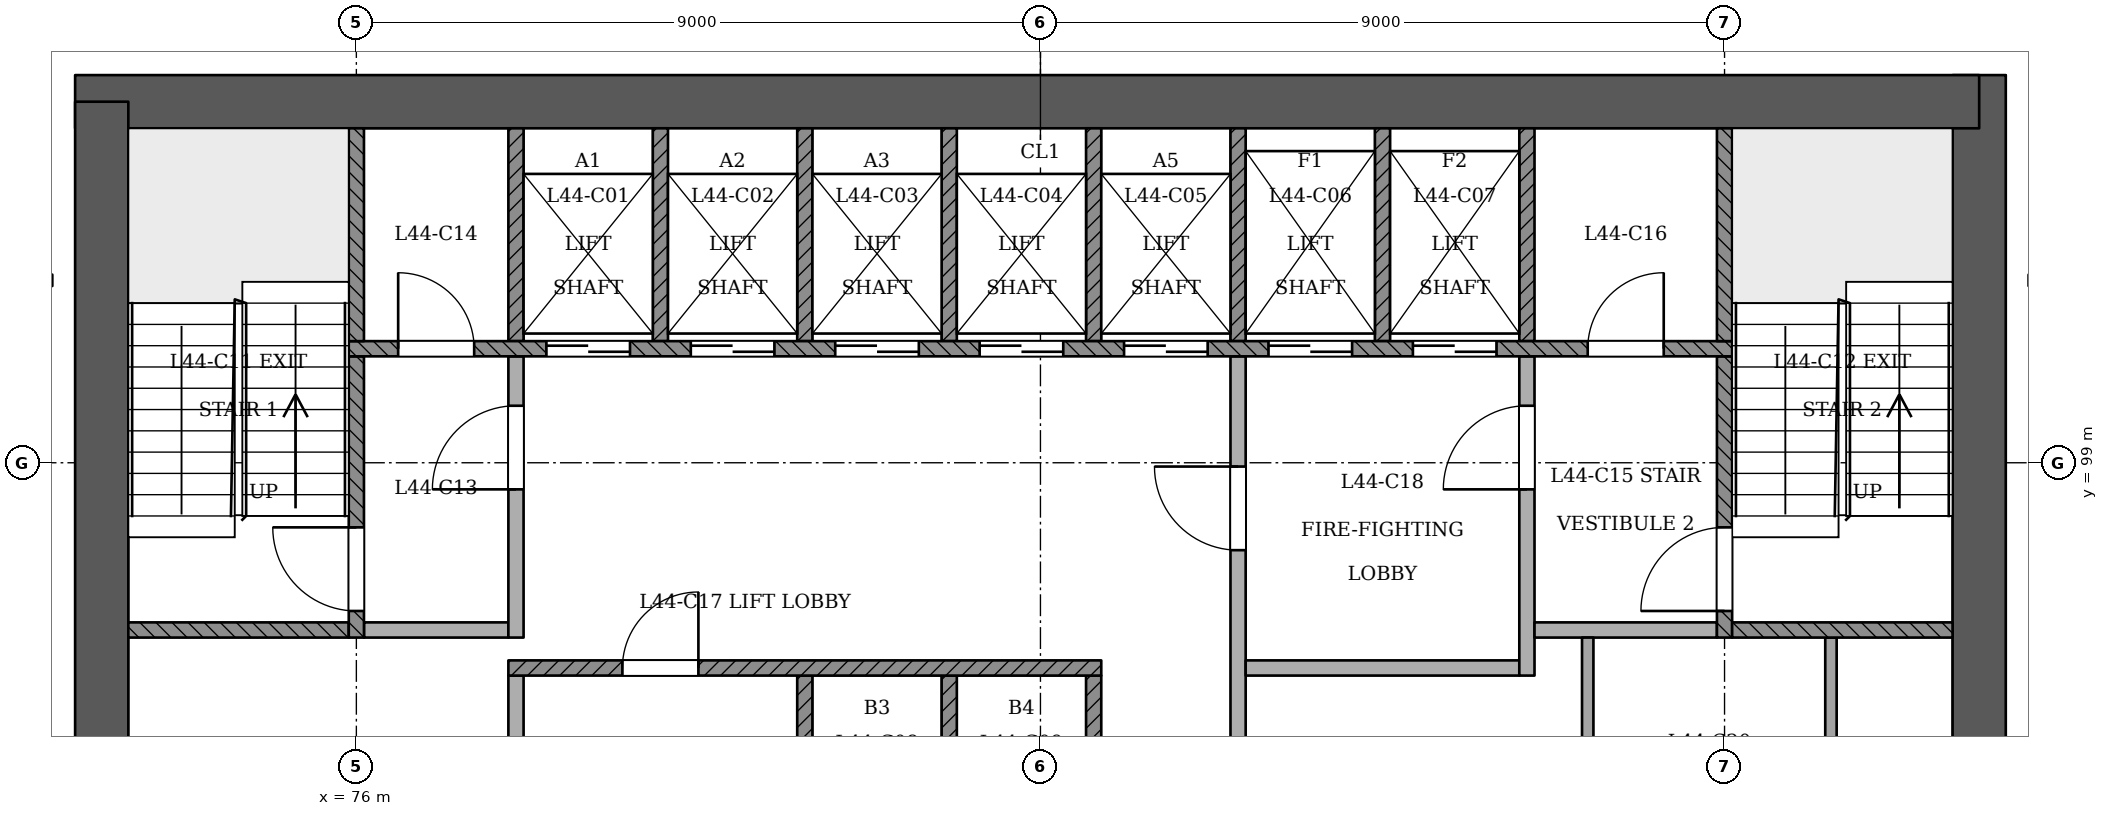
"""IFC4 building model, lengths in metres.
Left out: names, types, materials, properties, quantities, classifications, styles, units other than length and angle.
Written with IfcOpenShell. Run it as: python <this file> out.ifc"""

import sys

from ifc_helpers import new_model, si_unit, direction, frame, frame_2d, origin, place, context, subcontext, project, spatial, rectangle, extrude, element, fill, save


model = new_model("IFC4")
c1 = context("Model", 3, precision=1e-05, world=origin(), true_north=direction((0.0, 1.0)))
c2 = subcontext(c1, "Body", "Model", "MODEL_VIEW")
j1 = project(units=[si_unit("LENGTHUNIT", "METRE"), si_unit("PLANEANGLEUNIT", "RADIAN")], contexts=[c1])
p1 = place(None, origin())
s1 = spatial("IfcSite", under=j1, at=p1, CompositionType="ELEMENT")
p2 = place(p1, origin())
s2 = spatial("IfcBuilding", under=s1, at=p2, CompositionType="ELEMENT")
p3 = place(p2, frame((0.0, 0.0, 171.0)))
s3 = spatial("IfcBuildingStorey", under=s2, at=p3, CompositionType="ELEMENT", Elevation=171.0)
p4 = place(p3, frame((97.35, 93.05, 0.0), z_axis=(0.0, 0.0, 1.0), x_axis=(0.0, 1.0, 0.0)))
e1 = element("IfcWall", 1, at=p4, inside=s3, PredefinedType="SHEAR", context=c2, shape_type="SweptSolid", body=[
    extrude(rectangle(XDim=11.05, YDim=0.7, at=frame_2d((5.525, 0.0))), origin(), (0.0, 0.0, 1.0), 3.6),
])
p5 = place(p3, frame((97.35, 103.75, 0.0), z_axis=(0.0, 0.0, 1.0), x_axis=(-1.0, 0.0, 0.0)))
e2 = element("IfcWall", 2, at=p5, inside=s3, PredefinedType="SHEAR", context=c2, shape_type="SweptSolid", body=[
    extrude(rectangle(XDim=25.05, YDim=0.7, at=frame_2d((12.525, 0.0))), origin(), (0.0, 0.0, 1.0), 3.6),
])
p6 = place(p3, frame((72.65, 103.75, 0.0), z_axis=(0.0, 0.0, 1.0), x_axis=(0.0, -1.0, 0.0)))
e3 = element("IfcWall", 3, at=p6, inside=s3, PredefinedType="SHEAR", context=c2, shape_type="SweptSolid", body=[
    extrude(rectangle(XDim=11.05, YDim=0.7, at=frame_2d((5.525, 0.0))), origin(), (0.0, 0.0, 1.0), 3.6),
])
p7 = place(p3, frame((78.1, 93.4, 0.0), z_axis=(0.0, 0.0, 1.0), x_axis=(0.0, 1.0, 0.0)))
e4 = element("IfcWall", 4, at=p7, inside=s3, PredefinedType="PARTITIONING", context=c2, shape_type="SweptSolid", body=[
    extrude(rectangle(XDim=2.8, YDim=0.2, at=frame_2d((1.4, 0.0))), origin(), (0.0, 0.0, 1.0), 3.15),
])
for number, where, z_axis, x_axis in (
    (5, (81.9, 93.4, 0.0), (0.0, 0.0, 1.0), (0.0, 1.0, 0.0)),
    (6, (83.8, 93.4, 0.0), (0.0, 0.0, 1.0), (0.0, 1.0, 0.0)),
    (7, (85.7, 93.4, 0.0), (0.0, 0.0, 1.0), (0.0, 1.0, 0.0)),
):
    element("IfcWall", number, at=place(p3, frame(where, z_axis=z_axis, x_axis=x_axis)), inside=s3, PredefinedType="SOLIDWALL", context=c2, shape_type="SweptSolid", body=[
        extrude(rectangle(XDim=2.8, YDim=0.2, at=frame_2d((1.4, 0.0))), origin(), (0.0, 0.0, 1.0), 3.15),
    ])
p8 = place(p3, frame((87.6, 93.4, 0.0), z_axis=(0.0, 0.0, 1.0), x_axis=(0.0, 1.0, 0.0)))
e8 = element("IfcWall", 8, at=p8, inside=s3, PredefinedType="PARTITIONING", context=c2, shape_type="SweptSolid", body=[
    extrude(rectangle(XDim=7.0, YDim=0.2, at=frame_2d((3.5, 0.0))), origin(), (0.0, 0.0, 1.0), 3.15),
])
p9 = place(p8, frame((4.45, 0.0, 0.0)))
e9 = element("IfcOpeningElement", 9, at=p9, cuts=e8, PredefinedType="OPENING", context=c2, shape_type="SweptSolid", body=[
    extrude(rectangle(XDim=1.1, YDim=2.1, at=frame_2d((0.55, 1.05))), frame((0.0, 0.11, 0.0), z_axis=(0.0, -1.0, 0.0), x_axis=(1.0, 0.0, 0.0)), (0.0, 0.0, 1.0), 0.221),
])
for number, where, z_axis, x_axis in (
    (10, (92.2, 93.4, 0.0), (0.0, 0.0, 1.0), (0.0, 1.0, 0.0)),
    (11, (95.4, 93.4, 0.0), (0.0, 0.0, 1.0), (0.0, 1.0, 0.0)),
):
    element("IfcWall", number, at=place(p3, frame(where, z_axis=z_axis, x_axis=x_axis)), inside=s3, PredefinedType="PARTITIONING", context=c2, shape_type="SweptSolid", body=[
        extrude(rectangle(XDim=3.3, YDim=0.15, at=frame_2d((1.65, 0.0))), origin(), (0.0, 0.0, 1.0), 3.15),
    ])
p10 = place(p3, frame((78.0, 96.3, 0.0), z_axis=(0.0, 0.0, 1.0), x_axis=(1.0, 0.0, 0.0)))
e12 = element("IfcWall", 12, at=p10, inside=s3, PredefinedType="SOLIDWALL", context=c2, shape_type="SweptSolid", body=[
    extrude(rectangle(XDim=7.8, YDim=0.2, at=frame_2d((3.9, 0.0))), origin(), (0.0, 0.0, 1.0), 3.15),
])
p11 = place(p10, frame((1.5, 0.0, 0.0)))
e13 = element("IfcOpeningElement", 13, at=p11, cuts=e12, PredefinedType="OPENING", context=c2, shape_type="SweptSolid", body=[
    extrude(rectangle(XDim=1.0, YDim=2.1, at=frame_2d((0.5, 1.05))), frame((0.0, 0.11, 0.0), z_axis=(0.0, -1.0, 0.0), x_axis=(1.0, 0.0, 0.0)), (0.0, 0.0, 1.0), 0.221),
])
p12 = place(p3, frame((87.7, 96.3, 0.0), z_axis=(0.0, 0.0, 1.0), x_axis=(1.0, 0.0, 0.0)))
e14 = element("IfcWall", 14, at=p12, inside=s3, PredefinedType="PARTITIONING", context=c2, shape_type="SweptSolid", body=[
    extrude(rectangle(XDim=3.6, YDim=0.2, at=frame_2d((1.8, 0.0))), origin(), (0.0, 0.0, 1.0), 3.15),
])
p13 = place(p3, frame((91.4, 96.2, 0.0), z_axis=(0.0, 0.0, 1.0), x_axis=(0.0, 1.0, 0.0)))
e15 = element("IfcWall", 15, at=p13, inside=s3, PredefinedType="PARTITIONING", context=c2, shape_type="SweptSolid", body=[
    extrude(rectangle(XDim=4.2, YDim=0.2, at=frame_2d((2.1, 0.0))), origin(), (0.0, 0.0, 1.0), 3.15),
])
p14 = place(p13, frame((2.45, 0.0, 0.0)))
e16 = element("IfcOpeningElement", 16, at=p14, cuts=e15, PredefinedType="OPENING", context=c2, shape_type="SweptSolid", body=[
    extrude(rectangle(XDim=1.1, YDim=2.1, at=frame_2d((0.55, 1.05))), frame((0.0, 0.11, 0.0), z_axis=(0.0, -1.0, 0.0), x_axis=(1.0, 0.0, 0.0)), (0.0, 0.0, 1.0), 0.221),
])
p15 = place(p3, frame((73.0, 96.8, 0.0), z_axis=(0.0, 0.0, 1.0), x_axis=(1.0, 0.0, 0.0)))
e17 = element("IfcWall", 17, at=p15, inside=s3, PredefinedType="SOLIDWALL", context=c2, shape_type="SweptSolid", body=[
    extrude(rectangle(XDim=2.9, YDim=0.2, at=frame_2d((1.45, 0.0))), origin(), (0.0, 0.0, 1.0), 3.15),
])
p16 = place(p3, frame((76.0, 96.7, 0.0), z_axis=(0.0, 0.0, 1.0), x_axis=(0.0, 1.0, 0.0)))
e18 = element("IfcWall", 18, at=p16, inside=s3, PredefinedType="SOLIDWALL", context=c2, shape_type="SweptSolid", body=[
    extrude(rectangle(XDim=3.7, YDim=0.2, at=frame_2d((1.85, 0.0))), origin(), (0.0, 0.0, 1.0), 3.15),
])
p17 = place(p16, frame((0.35, 0.0, 0.0)))
e19 = element("IfcOpeningElement", 19, at=p17, cuts=e18, PredefinedType="OPENING", context=c2, shape_type="SweptSolid", body=[
    extrude(rectangle(XDim=1.1, YDim=2.1, at=frame_2d((0.55, 1.05))), frame((0.0, 0.11, 0.0), z_axis=(0.0, -1.0, 0.0), x_axis=(1.0, 0.0, 0.0)), (0.0, 0.0, 1.0), 0.221),
])
p18 = place(p3, frame((76.1, 96.8, 0.0), z_axis=(0.0, 0.0, 1.0), x_axis=(1.0, 0.0, 0.0)))
e20 = element("IfcWall", 20, at=p18, inside=s3, PredefinedType="PARTITIONING", context=c2, shape_type="SweptSolid", body=[
    extrude(rectangle(XDim=1.9, YDim=0.2, at=frame_2d((0.95, 0.0))), origin(), (0.0, 0.0, 1.0), 3.15),
])
p19 = place(p3, frame((78.1, 96.7, 0.0), z_axis=(0.0, 0.0, 1.0), x_axis=(0.0, 1.0, 0.0)))
e21 = element("IfcWall", 21, at=p19, inside=s3, PredefinedType="PARTITIONING", context=c2, shape_type="SweptSolid", body=[
    extrude(rectangle(XDim=3.7, YDim=0.2, at=frame_2d((1.85, 0.0))), origin(), (0.0, 0.0, 1.0), 3.15),
])
p20 = place(p19, frame((1.95, 0.0, 0.0)))
e22 = element("IfcOpeningElement", 22, at=p20, cuts=e21, PredefinedType="OPENING", context=c2, shape_type="SweptSolid", body=[
    extrude(rectangle(XDim=1.1, YDim=2.1, at=frame_2d((0.55, 1.05))), frame((0.0, 0.11, 0.0), z_axis=(0.0, -1.0, 0.0), x_axis=(1.0, 0.0, 0.0)), (0.0, 0.0, 1.0), 0.221),
])
p21 = place(p3, frame((91.5, 96.8, 0.0), z_axis=(0.0, 0.0, 1.0), x_axis=(1.0, 0.0, 0.0)))
e23 = element("IfcWall", 23, at=p21, inside=s3, PredefinedType="PARTITIONING", context=c2, shape_type="SweptSolid", body=[
    extrude(rectangle(XDim=2.4, YDim=0.2, at=frame_2d((1.2, 0.0))), origin(), (0.0, 0.0, 1.0), 3.15),
])
p22 = place(p3, frame((94.0, 96.7, 0.0), z_axis=(0.0, 0.0, 1.0), x_axis=(0.0, 1.0, 0.0)))
e24 = element("IfcWall", 24, at=p22, inside=s3, PredefinedType="SOLIDWALL", context=c2, shape_type="SweptSolid", body=[
    extrude(rectangle(XDim=3.7, YDim=0.2, at=frame_2d((1.85, 0.0))), origin(), (0.0, 0.0, 1.0), 3.15),
])
p23 = place(p22, frame((0.35, 0.0, 0.0)))
e25 = element("IfcOpeningElement", 25, at=p23, cuts=e24, PredefinedType="OPENING", context=c2, shape_type="SweptSolid", body=[
    extrude(rectangle(XDim=1.1, YDim=2.1, at=frame_2d((0.55, 1.05))), frame((0.0, 0.11, 0.0), z_axis=(0.0, -1.0, 0.0), x_axis=(1.0, 0.0, 0.0)), (0.0, 0.0, 1.0), 0.221),
])
p24 = place(p3, frame((94.1, 96.8, 0.0), z_axis=(0.0, 0.0, 1.0), x_axis=(1.0, 0.0, 0.0)))
e26 = element("IfcWall", 26, at=p24, inside=s3, PredefinedType="SOLIDWALL", context=c2, shape_type="SweptSolid", body=[
    extrude(rectangle(XDim=2.9, YDim=0.2, at=frame_2d((1.45, 0.0))), origin(), (0.0, 0.0, 1.0), 3.15),
])
p25 = place(p3, frame((75.9, 100.5, 0.0), z_axis=(0.0, 0.0, 1.0), x_axis=(1.0, 0.0, 0.0)))
e27 = element("IfcWall", 27, at=p25, inside=s3, PredefinedType="SOLIDWALL", context=c2, shape_type="SweptSolid", body=[
    extrude(rectangle(XDim=18.2, YDim=0.2, at=frame_2d((9.1, 0.0))), origin(), (0.0, 0.0, 1.0), 3.15),
])
p26 = place(p25, frame((2.6, 0.0, 0.0)))
e28 = element("IfcOpeningElement", 28, at=p26, cuts=e27, PredefinedType="OPENING", context=c2, shape_type="SweptSolid", body=[
    extrude(rectangle(XDim=1.1, YDim=2.1, at=frame_2d((0.55, 1.05))), frame((0.0, 0.11, 0.0), z_axis=(0.0, -1.0, 0.0), x_axis=(1.0, 0.0, 0.0)), (0.0, 0.0, 1.0), 0.221),
])
p27 = place(p25, frame((4.5, 0.0, 0.0)))
e29 = element("IfcOpeningElement", 29, at=p27, cuts=e27, PredefinedType="OPENING", context=c2, shape_type="SweptSolid", body=[
    extrude(rectangle(XDim=1.1, YDim=2.1, at=frame_2d((0.55, 1.05))), frame((0.0, 0.11, 0.0), z_axis=(0.0, -1.0, 0.0), x_axis=(1.0, 0.0, 0.0)), (0.0, 0.0, 1.0), 0.221),
])
p28 = place(p25, frame((6.4, 0.0, 0.0)))
e30 = element("IfcOpeningElement", 30, at=p28, cuts=e27, PredefinedType="OPENING", context=c2, shape_type="SweptSolid", body=[
    extrude(rectangle(XDim=1.1, YDim=2.1, at=frame_2d((0.55, 1.05))), frame((0.0, 0.11, 0.0), z_axis=(0.0, -1.0, 0.0), x_axis=(1.0, 0.0, 0.0)), (0.0, 0.0, 1.0), 0.221),
])
p29 = place(p25, frame((8.3, 0.0, 0.0)))
e31 = element("IfcOpeningElement", 31, at=p29, cuts=e27, PredefinedType="OPENING", context=c2, shape_type="SweptSolid", body=[
    extrude(rectangle(XDim=1.1, YDim=2.1, at=frame_2d((0.55, 1.05))), frame((0.0, 0.11, 0.0), z_axis=(0.0, -1.0, 0.0), x_axis=(1.0, 0.0, 0.0)), (0.0, 0.0, 1.0), 0.221),
])
p30 = place(p25, frame((10.2, 0.0, 0.0)))
e32 = element("IfcOpeningElement", 32, at=p30, cuts=e27, PredefinedType="OPENING", context=c2, shape_type="SweptSolid", body=[
    extrude(rectangle(XDim=1.1, YDim=2.1, at=frame_2d((0.55, 1.05))), frame((0.0, 0.11, 0.0), z_axis=(0.0, -1.0, 0.0), x_axis=(1.0, 0.0, 0.0)), (0.0, 0.0, 1.0), 0.221),
])
p31 = place(p25, frame((12.1, 0.0, 0.0)))
e33 = element("IfcOpeningElement", 33, at=p31, cuts=e27, PredefinedType="OPENING", context=c2, shape_type="SweptSolid", body=[
    extrude(rectangle(XDim=1.1, YDim=2.1, at=frame_2d((0.55, 1.05))), frame((0.0, 0.11, 0.0), z_axis=(0.0, -1.0, 0.0), x_axis=(1.0, 0.0, 0.0)), (0.0, 0.0, 1.0), 0.221),
])
p32 = place(p25, frame((14.0, 0.0, 0.0)))
e34 = element("IfcOpeningElement", 34, at=p32, cuts=e27, PredefinedType="OPENING", context=c2, shape_type="SweptSolid", body=[
    extrude(rectangle(XDim=1.1, YDim=2.1, at=frame_2d((0.55, 1.05))), frame((0.0, 0.11, 0.0), z_axis=(0.0, -1.0, 0.0), x_axis=(1.0, 0.0, 0.0)), (0.0, 0.0, 1.0), 0.221),
])
p33 = place(p25, frame((0.65, 0.0, 0.0)))
e35 = element("IfcOpeningElement", 35, at=p33, cuts=e27, PredefinedType="OPENING", context=c2, shape_type="SweptSolid", body=[
    extrude(rectangle(XDim=1.0, YDim=2.1, at=frame_2d((0.5, 1.05))), frame((0.0, 0.11, 0.0), z_axis=(0.0, -1.0, 0.0), x_axis=(1.0, 0.0, 0.0)), (0.0, 0.0, 1.0), 0.221),
])
p34 = place(p25, frame((16.3, 0.0, 0.0)))
e36 = element("IfcOpeningElement", 36, at=p34, cuts=e27, PredefinedType="OPENING", context=c2, shape_type="SweptSolid", body=[
    extrude(rectangle(XDim=1.0, YDim=2.1, at=frame_2d((0.5, 1.05))), frame((0.0, 0.11, 0.0), z_axis=(0.0, -1.0, 0.0), x_axis=(1.0, 0.0, 0.0)), (0.0, 0.0, 1.0), 0.221),
])
for number, where, z_axis, x_axis in (
    (37, (76.0, 100.6, 0.0), (0.0, 0.0, 1.0), (0.0, 1.0, 0.0)),
    (38, (78.1, 100.6, 0.0), (0.0, 0.0, 1.0), (0.0, 1.0, 0.0)),
    (39, (80.0, 100.6, 0.0), (0.0, 0.0, 1.0), (0.0, 1.0, 0.0)),
    (40, (81.9, 100.6, 0.0), (0.0, 0.0, 1.0), (0.0, 1.0, 0.0)),
    (41, (83.8, 100.6, 0.0), (0.0, 0.0, 1.0), (0.0, 1.0, 0.0)),
    (42, (85.7, 100.6, 0.0), (0.0, 0.0, 1.0), (0.0, 1.0, 0.0)),
    (43, (87.6, 100.6, 0.0), (0.0, 0.0, 1.0), (0.0, 1.0, 0.0)),
    (44, (89.5, 100.6, 0.0), (0.0, 0.0, 1.0), (0.0, 1.0, 0.0)),
    (45, (91.4, 100.6, 0.0), (0.0, 0.0, 1.0), (0.0, 1.0, 0.0)),
    (46, (94.0, 100.6, 0.0), (0.0, 0.0, 1.0), (0.0, 1.0, 0.0)),
):
    element("IfcWall", number, at=place(p3, frame(where, z_axis=z_axis, x_axis=x_axis)), inside=s3, PredefinedType="SOLIDWALL", context=c2, shape_type="SweptSolid", body=[
        extrude(rectangle(XDim=2.8, YDim=0.2, at=frame_2d((1.4, 0.0))), origin(), (0.0, 0.0, 1.0), 3.15),
    ])
p35 = place(p26, origin())
e47 = element("IfcDoor", 47, at=p35, inside=s3, OperationType="SLIDING_TO_RIGHT", PredefinedType="NOTDEFINED", context=c2, shape_type="SweptSolid", body=[
    extrude(rectangle(XDim=1.1, YDim=2.1, at=frame_2d((0.55, 1.05))), frame((0.0, 0.025, 0.0), z_axis=(0.0, -1.0, 0.0), x_axis=(1.0, 0.0, 0.0)), (0.0, 0.0, 1.0), 0.05),
])
fill(e28, e47)
p36 = place(p27, origin())
e48 = element("IfcDoor", 48, at=p36, inside=s3, OperationType="SLIDING_TO_LEFT", PredefinedType="NOTDEFINED", context=c2, shape_type="SweptSolid", body=[
    extrude(rectangle(XDim=1.1, YDim=2.1, at=frame_2d((0.55, 1.05))), frame((0.0, 0.025, 0.0), z_axis=(0.0, -1.0, 0.0), x_axis=(1.0, 0.0, 0.0)), (0.0, 0.0, 1.0), 0.05),
])
fill(e29, e48)
p37 = place(p28, origin())
e49 = element("IfcDoor", 49, at=p37, inside=s3, OperationType="SLIDING_TO_RIGHT", PredefinedType="NOTDEFINED", context=c2, shape_type="SweptSolid", body=[
    extrude(rectangle(XDim=1.1, YDim=2.1, at=frame_2d((0.55, 1.05))), frame((0.0, 0.025, 0.0), z_axis=(0.0, -1.0, 0.0), x_axis=(1.0, 0.0, 0.0)), (0.0, 0.0, 1.0), 0.05),
])
fill(e30, e49)
p38 = place(p29, origin())
e50 = element("IfcDoor", 50, at=p38, inside=s3, OperationType="SLIDING_TO_LEFT", PredefinedType="NOTDEFINED", context=c2, shape_type="SweptSolid", body=[
    extrude(rectangle(XDim=1.1, YDim=2.1, at=frame_2d((0.55, 1.05))), frame((0.0, 0.025, 0.0), z_axis=(0.0, -1.0, 0.0), x_axis=(1.0, 0.0, 0.0)), (0.0, 0.0, 1.0), 0.05),
])
fill(e31, e50)
p39 = place(p30, origin())
e51 = element("IfcDoor", 51, at=p39, inside=s3, OperationType="SLIDING_TO_RIGHT", PredefinedType="NOTDEFINED", context=c2, shape_type="SweptSolid", body=[
    extrude(rectangle(XDim=1.1, YDim=2.1, at=frame_2d((0.55, 1.05))), frame((0.0, 0.025, 0.0), z_axis=(0.0, -1.0, 0.0), x_axis=(1.0, 0.0, 0.0)), (0.0, 0.0, 1.0), 0.05),
])
fill(e32, e51)
p40 = place(p31, origin())
e52 = element("IfcDoor", 52, at=p40, inside=s3, OperationType="SLIDING_TO_RIGHT", PredefinedType="NOTDEFINED", context=c2, shape_type="SweptSolid", body=[
    extrude(rectangle(XDim=1.1, YDim=2.1, at=frame_2d((0.55, 1.05))), frame((0.0, 0.025, 0.0), z_axis=(0.0, -1.0, 0.0), x_axis=(1.0, 0.0, 0.0)), (0.0, 0.0, 1.0), 0.05),
])
fill(e33, e52)
p41 = place(p32, origin())
e53 = element("IfcDoor", 53, at=p41, inside=s3, OperationType="SLIDING_TO_LEFT", PredefinedType="NOTDEFINED", context=c2, shape_type="SweptSolid", body=[
    extrude(rectangle(XDim=1.1, YDim=2.1, at=frame_2d((0.55, 1.05))), frame((0.0, 0.025, 0.0), z_axis=(0.0, -1.0, 0.0), x_axis=(1.0, 0.0, 0.0)), (0.0, 0.0, 1.0), 0.05),
])
fill(e34, e53)
p42 = place(p17, origin())
e54 = element("IfcDoor", 54, at=p42, inside=s3, OperationType="SINGLE_SWING_RIGHT", PredefinedType="NOTDEFINED", context=c2, shape_type="SweptSolid", body=[
    extrude(rectangle(XDim=1.1, YDim=2.1, at=frame_2d((0.55, 1.05))), frame((0.0, 0.025, 0.0), z_axis=(0.0, -1.0, 0.0), x_axis=(1.0, 0.0, 0.0)), (0.0, 0.0, 1.0), 0.05),
])
fill(e19, e54)
p43 = place(p23, origin())
e55 = element("IfcDoor", 55, at=p43, inside=s3, OperationType="SINGLE_SWING_LEFT", PredefinedType="NOTDEFINED", context=c2, shape_type="SweptSolid", body=[
    extrude(rectangle(XDim=1.1, YDim=2.1, at=frame_2d((0.55, 1.05))), frame((0.0, 0.025, 0.0), z_axis=(0.0, -1.0, 0.0), x_axis=(1.0, 0.0, 0.0)), (0.0, 0.0, 1.0), 0.05),
])
fill(e25, e55)
p44 = place(p20, origin())
e56 = element("IfcDoor", 56, at=p44, inside=s3, OperationType="SINGLE_SWING_LEFT", PredefinedType="NOTDEFINED", context=c2, shape_type="SweptSolid", body=[
    extrude(rectangle(XDim=1.1, YDim=2.1, at=frame_2d((0.55, 1.05))), frame((0.0, 0.025, 0.0), z_axis=(0.0, -1.0, 0.0), x_axis=(1.0, 0.0, 0.0)), (0.0, 0.0, 1.0), 0.05),
])
fill(e22, e56)
p45 = place(p9, origin())
e57 = element("IfcDoor", 57, at=p45, inside=s3, OperationType="SINGLE_SWING_RIGHT", PredefinedType="NOTDEFINED", context=c2, shape_type="SweptSolid", body=[
    extrude(rectangle(XDim=1.1, YDim=2.1, at=frame_2d((0.55, 1.05))), frame((0.0, 0.025, 0.0), z_axis=(0.0, -1.0, 0.0), x_axis=(1.0, 0.0, 0.0)), (0.0, 0.0, 1.0), 0.05),
])
fill(e9, e57)
p46 = place(p14, origin())
e58 = element("IfcDoor", 58, at=p46, inside=s3, OperationType="SINGLE_SWING_LEFT", PredefinedType="NOTDEFINED", context=c2, shape_type="SweptSolid", body=[
    extrude(rectangle(XDim=1.1, YDim=2.1, at=frame_2d((0.55, 1.05))), frame((0.0, 0.025, 0.0), z_axis=(0.0, -1.0, 0.0), x_axis=(1.0, 0.0, 0.0)), (0.0, 0.0, 1.0), 0.05),
])
fill(e16, e58)
p47 = place(p33, origin())
e59 = element("IfcDoor", 59, at=p47, inside=s3, OperationType="SINGLE_SWING_LEFT", PredefinedType="NOTDEFINED", context=c2, shape_type="SweptSolid", body=[
    extrude(rectangle(XDim=1.0, YDim=2.1, at=frame_2d((0.5, 1.05))), frame((0.0, 0.025, 0.0), z_axis=(0.0, -1.0, 0.0), x_axis=(1.0, 0.0, 0.0)), (0.0, 0.0, 1.0), 0.05),
])
fill(e35, e59)
p48 = place(p34, origin())
e60 = element("IfcDoor", 60, at=p48, inside=s3, OperationType="SINGLE_SWING_RIGHT", PredefinedType="NOTDEFINED", context=c2, shape_type="SweptSolid", body=[
    extrude(rectangle(XDim=1.0, YDim=2.1, at=frame_2d((0.5, 1.05))), frame((0.0, 0.025, 0.0), z_axis=(0.0, -1.0, 0.0), x_axis=(1.0, 0.0, 0.0)), (0.0, 0.0, 1.0), 0.05),
])
fill(e36, e60)
p49 = place(p11, origin())
e61 = element("IfcDoor", 61, at=p49, inside=s3, OperationType="SINGLE_SWING_RIGHT", PredefinedType="NOTDEFINED", context=c2, shape_type="SweptSolid", body=[
    extrude(rectangle(XDim=1.0, YDim=2.1, at=frame_2d((0.5, 1.05))), frame((0.0, 0.025, 0.0), z_axis=(0.0, -1.0, 0.0), x_axis=(1.0, 0.0, 0.0)), (0.0, 0.0, 1.0), 0.05),
])
fill(e13, e61)
save(model, sys.argv[1])
